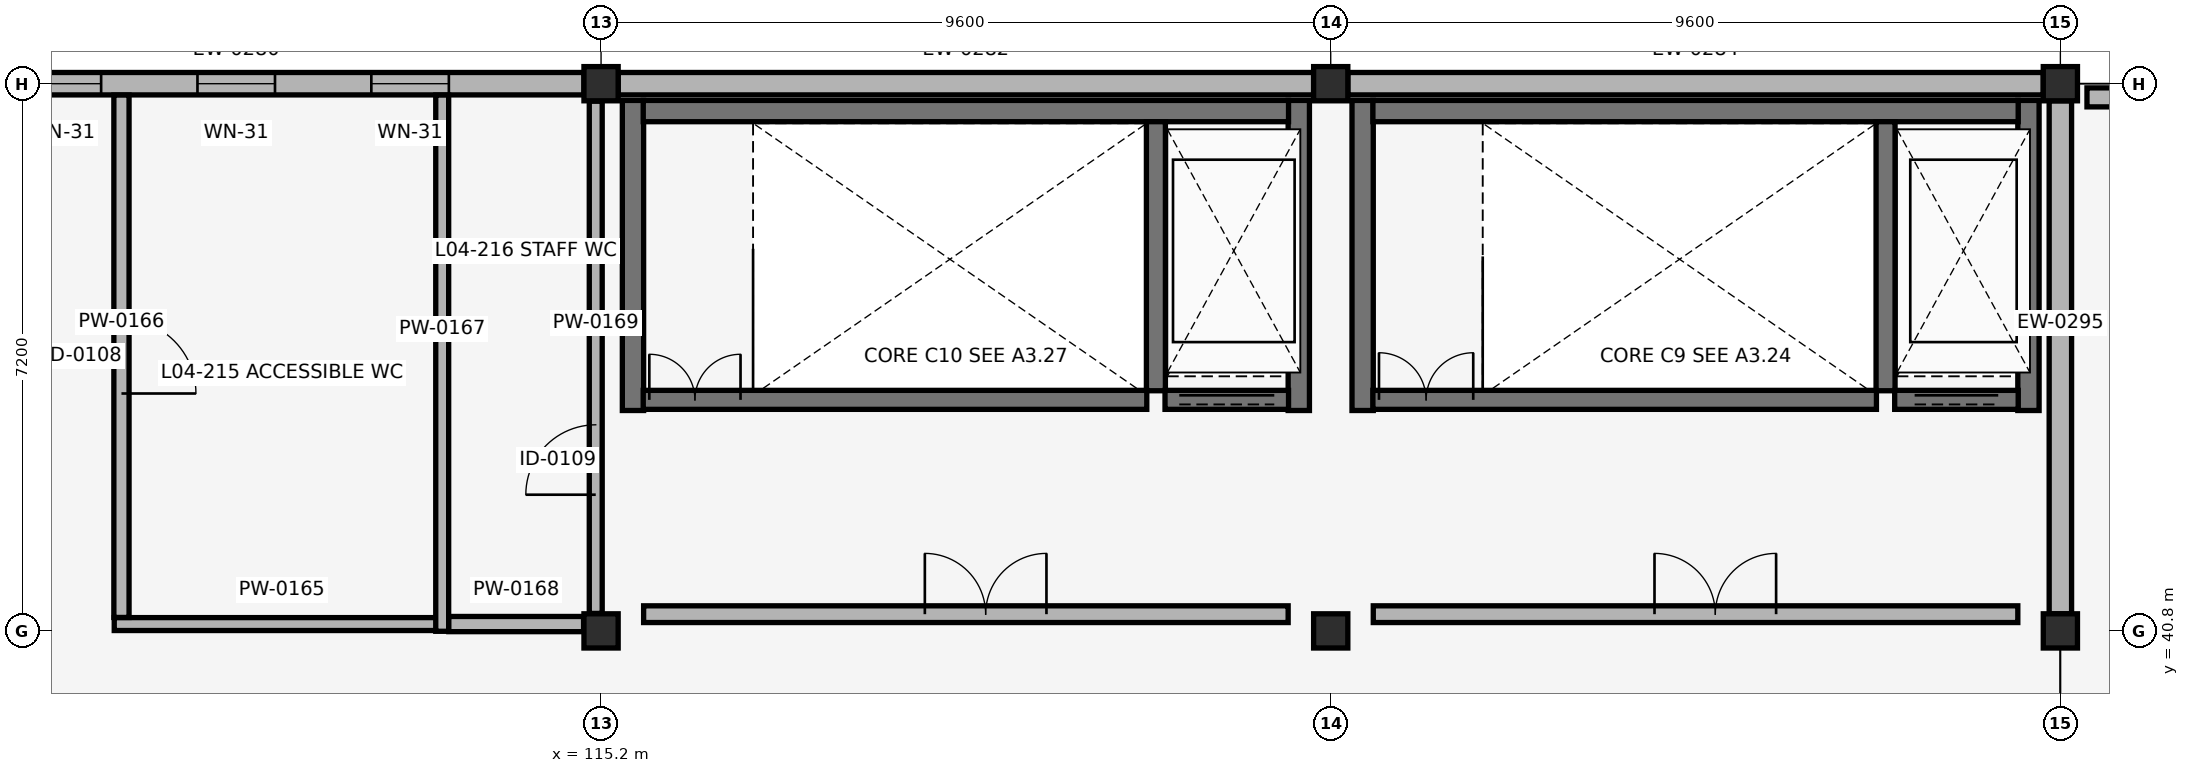
"""IFC4 building model, lengths in metres.
Left out: names, types, materials, properties, quantities, classifications, styles, units other than length and angle.
Written with IfcOpenShell. Run it as: python <this file> out.ifc"""

import sys

from ifc_helpers import new_model, si_unit, direction, frame, frame_2d, origin, origin_2d, place, context, subcontext, project, spatial, rectangle, extrude, element, fill, save


model = new_model("IFC4")
c1 = context("Model", 3, precision=1e-05, world=origin(), true_north=direction((0.0, 1.0)))
c2 = subcontext(c1, "Body", "Model", "MODEL_VIEW")
j1 = project(units=[si_unit("LENGTHUNIT", "METRE"), si_unit("PLANEANGLEUNIT", "RADIAN")], contexts=[c1])
p1 = place(None, origin())
s1 = spatial("IfcSite", under=j1, at=p1, CompositionType="ELEMENT")
p2 = place(p1, origin())
s2 = spatial("IfcBuilding", under=s1, at=p2, CompositionType="ELEMENT")
p3 = place(p2, frame((0.0, 0.0, 16.66)))
s3 = spatial("IfcBuildingStorey", under=s2, at=p3, CompositionType="ELEMENT", Elevation=16.66)
for number, where, z_axis, x_axis in (
    (1, (115.2, 40.8, 0.0), (0.0, 0.0, 1.0), (1.0, 0.0, 0.0)),
    (2, (115.2, 48.0, 0.0), (0.0, 0.0, 1.0), (1.0, 0.0, 0.0)),
    (3, (124.8, 40.8, 0.0), (0.0, 0.0, 1.0), (1.0, 0.0, 0.0)),
    (4, (124.8, 48.0, 0.0), (0.0, 0.0, 1.0), (1.0, 0.0, 0.0)),
    (5, (134.4, 40.8, 0.0), (0.0, 0.0, 1.0), (1.0, 0.0, 0.0)),
    (6, (134.4, 48.0, 0.0), (0.0, 0.0, 1.0), (1.0, 0.0, 0.0)),
):
    element("IfcColumn", number, at=place(p3, frame(where, z_axis=z_axis, x_axis=x_axis)), inside=s3, PredefinedType="COLUMN", context=c2, shape_type="SweptSolid", body=[
        extrude(rectangle(XDim=0.45, YDim=0.45, at=origin_2d()), origin(), (0.0, 0.0, 1.0), 4.08),
    ])
p4 = place(p3, frame((114.975, 48.0, 0.0), z_axis=(0.0, 0.0, 1.0), x_axis=(-1.0, 0.0, 0.0)))
e7 = element("IfcWall", 7, at=p4, inside=s3, PredefinedType="SOLIDWALL", context=c2, shape_type="SweptSolid", body=[
    extrude(rectangle(XDim=9.15, YDim=0.295, at=frame_2d((4.575, 0.0))), origin(), (0.0, 0.0, 1.0), 3.06),
])
p5 = place(p4, frame((1.778, 0.0, 0.88)))
e8 = element("IfcOpeningElement", 8, at=p5, cuts=e7, PredefinedType="OPENING", context=c2, shape_type="SweptSolid", body=[
    extrude(rectangle(XDim=1.02, YDim=1.88, at=frame_2d((0.51, 0.94))), frame((0.0, 0.157, 0.0), z_axis=(0.0, -1.0, 0.0), x_axis=(1.0, 0.0, 0.0)), (0.0, 0.0, 1.0), 0.315),
])
p6 = place(p4, frame((4.065, 0.0, 0.88)))
e9 = element("IfcOpeningElement", 9, at=p6, cuts=e7, PredefinedType="OPENING", context=c2, shape_type="SweptSolid", body=[
    extrude(rectangle(XDim=1.02, YDim=1.88, at=frame_2d((0.51, 0.94))), frame((0.0, 0.157, 0.0), z_axis=(0.0, -1.0, 0.0), x_axis=(1.0, 0.0, 0.0)), (0.0, 0.0, 1.0), 0.315),
])
p7 = place(p4, frame((6.353, 0.0, 0.88)))
e10 = element("IfcOpeningElement", 10, at=p7, cuts=e7, PredefinedType="OPENING", context=c2, shape_type="SweptSolid", body=[
    extrude(rectangle(XDim=1.02, YDim=1.88, at=frame_2d((0.51, 0.94))), frame((0.0, 0.157, 0.0), z_axis=(0.0, -1.0, 0.0), x_axis=(1.0, 0.0, 0.0)), (0.0, 0.0, 1.0), 0.315),
])
p8 = place(p3, frame((124.575, 48.0, 0.0), z_axis=(0.0, 0.0, 1.0), x_axis=(-1.0, 0.0, 0.0)))
e11 = element("IfcWall", 11, at=p8, inside=s3, PredefinedType="SOLIDWALL", context=c2, shape_type="SweptSolid", body=[
    extrude(rectangle(XDim=9.15, YDim=0.295, at=frame_2d((4.575, 0.0))), origin(), (0.0, 0.0, 1.0), 3.06),
])
p9 = place(p3, frame((134.175, 48.0, 0.0), z_axis=(0.0, 0.0, 1.0), x_axis=(-1.0, 0.0, 0.0)))
e12 = element("IfcWall", 12, at=p9, inside=s3, PredefinedType="SOLIDWALL", context=c2, shape_type="SweptSolid", body=[
    extrude(rectangle(XDim=9.15, YDim=0.295, at=frame_2d((4.575, 0.0))), origin(), (0.0, 0.0, 1.0), 3.06),
])
p10 = place(p3, frame((134.4, 41.025, 0.0), z_axis=(0.0, 0.0, 1.0), x_axis=(0.0, 1.0, 0.0)))
e13 = element("IfcWall", 13, at=p10, inside=s3, PredefinedType="SOLIDWALL", context=c2, shape_type="SweptSolid", body=[
    extrude(rectangle(XDim=6.75, YDim=0.295, at=frame_2d((3.375, 0.0))), origin(), (0.0, 0.0, 1.0), 3.06),
])
p11 = place(p3, frame((134.75, 47.82, 0.0), z_axis=(0.0, 0.0, 1.0), x_axis=(1.0, 0.0, 0.0)))
e14 = element("IfcWall", 14, at=p11, inside=s3, PredefinedType="PARAPET", context=c2, shape_type="SweptSolid", body=[
    extrude(rectangle(XDim=18.5, YDim=0.25, at=frame_2d((9.25, 0.0))), origin(), (0.0, 0.0, 1.0), 1.12),
])
for number, where, z_axis, x_axis in (
    (15, (125.22, 43.7, 0.0), (0.0, 0.0, 1.0), (0.0, 1.0, 0.0)),
    (16, (133.98, 43.7, 0.0), (0.0, 0.0, 1.0), (0.0, 1.0, 0.0)),
):
    element("IfcWall", number, at=place(p3, frame(where, z_axis=z_axis, x_axis=x_axis)), inside=s3, PredefinedType="SHEAR", context=c2, shape_type="SweptSolid", body=[
        extrude(rectangle(XDim=4.08, YDim=0.28, at=frame_2d((2.04, 0.0))), origin(), (0.0, 0.0, 1.0), 3.78),
    ])
p12 = place(p3, frame((125.355, 47.64, 0.0), z_axis=(0.0, 0.0, 1.0), x_axis=(1.0, 0.0, 0.0)))
e17 = element("IfcWall", 17, at=p12, inside=s3, PredefinedType="SHEAR", context=c2, shape_type="SweptSolid", body=[
    extrude(rectangle(XDim=8.49, YDim=0.28, at=frame_2d((4.245, 0.0))), origin(), (0.0, 0.0, 1.0), 3.78),
])
p13 = place(p3, frame((132.1, 43.96, 0.0), z_axis=(0.0, 0.0, 1.0), x_axis=(0.0, 1.0, 0.0)))
e18 = element("IfcWall", 18, at=p13, inside=s3, PredefinedType="SHEAR", context=c2, shape_type="SweptSolid", body=[
    extrude(rectangle(XDim=3.54, YDim=0.25, at=frame_2d((1.77, 0.0))), origin(), (0.0, 0.0, 1.0), 3.78),
])
p14 = place(p3, frame((125.355, 43.84, 0.0), z_axis=(0.0, 0.0, 1.0), x_axis=(1.0, 0.0, 0.0)))
e19 = element("IfcWall", 19, at=p14, inside=s3, PredefinedType="SHEAR", context=c2, shape_type="SweptSolid", body=[
    extrude(rectangle(XDim=6.625, YDim=0.25, at=frame_2d((3.312, 0.0))), origin(), (0.0, 0.0, 1.0), 3.78),
])
p15 = place(p14, frame((0.08, 0.0, 0.0)))
e20 = element("IfcOpeningElement", 20, at=p15, cuts=e19, PredefinedType="OPENING", context=c2, shape_type="SweptSolid", body=[
    extrude(rectangle(XDim=1.24, YDim=2.15, at=frame_2d((0.62, 1.075))), frame((0.0, 0.135, 0.0), z_axis=(0.0, -1.0, 0.0), x_axis=(1.0, 0.0, 0.0)), (0.0, 0.0, 1.0), 0.27),
])
p16 = place(p3, frame((125.36, 41.02, 0.0), z_axis=(0.0, 0.0, 1.0), x_axis=(1.0, 0.0, 0.0)))
e21 = element("IfcWall", 21, at=p16, inside=s3, PredefinedType="PARTITIONING", context=c2, shape_type="SweptSolid", body=[
    extrude(rectangle(XDim=8.48, YDim=0.22, at=frame_2d((4.24, 0.0))), origin(), (0.0, 0.0, 1.0), 3.19),
])
p17 = place(p16, frame((3.7, 0.0, 0.0)))
e22 = element("IfcOpeningElement", 22, at=p17, cuts=e21, PredefinedType="OPENING", context=c2, shape_type="SweptSolid", body=[
    extrude(rectangle(XDim=1.6, YDim=2.2, at=frame_2d((0.8, 1.1))), frame((0.0, 0.12, 0.0), z_axis=(0.0, -1.0, 0.0), x_axis=(1.0, 0.0, 0.0)), (0.0, 0.0, 1.0), 0.24),
])
p18 = place(p3, frame((132.22, 43.84, 0.0), z_axis=(0.0, 0.0, 1.0), x_axis=(1.0, 0.0, 0.0)))
e23 = element("IfcWall", 23, at=p18, inside=s3, PredefinedType="SHEAR", context=c2, shape_type="SweptSolid", body=[
    extrude(rectangle(XDim=1.625, YDim=0.25, at=frame_2d((0.812, 0.0))), origin(), (0.0, 0.0, 1.0), 3.78),
])
p19 = place(p18, frame((0.262, 0.0, 0.0)))
e24 = element("IfcOpeningElement", 24, at=p19, cuts=e23, PredefinedType="OPENING", context=c2, shape_type="SweptSolid", body=[
    extrude(rectangle(XDim=1.1, YDim=2.15, at=frame_2d((0.55, 1.075))), frame((0.0, 0.135, 0.0), z_axis=(0.0, -1.0, 0.0), x_axis=(1.0, 0.0, 0.0)), (0.0, 0.0, 1.0), 0.27),
])
for number, where, z_axis, x_axis in (
    (25, (115.62, 43.7, 0.0), (0.0, 0.0, 1.0), (0.0, 1.0, 0.0)),
    (26, (124.38, 43.7, 0.0), (0.0, 0.0, 1.0), (0.0, 1.0, 0.0)),
):
    element("IfcWall", number, at=place(p3, frame(where, z_axis=z_axis, x_axis=x_axis)), inside=s3, PredefinedType="SHEAR", context=c2, shape_type="SweptSolid", body=[
        extrude(rectangle(XDim=4.08, YDim=0.28, at=frame_2d((2.04, 0.0))), origin(), (0.0, 0.0, 1.0), 3.78),
    ])
p20 = place(p3, frame((115.755, 47.64, 0.0), z_axis=(0.0, 0.0, 1.0), x_axis=(1.0, 0.0, 0.0)))
e27 = element("IfcWall", 27, at=p20, inside=s3, PredefinedType="SHEAR", context=c2, shape_type="SweptSolid", body=[
    extrude(rectangle(XDim=8.49, YDim=0.28, at=frame_2d((4.245, 0.0))), origin(), (0.0, 0.0, 1.0), 3.78),
])
p21 = place(p3, frame((122.5, 43.96, 0.0), z_axis=(0.0, 0.0, 1.0), x_axis=(0.0, 1.0, 0.0)))
e28 = element("IfcWall", 28, at=p21, inside=s3, PredefinedType="SHEAR", context=c2, shape_type="SweptSolid", body=[
    extrude(rectangle(XDim=3.54, YDim=0.25, at=frame_2d((1.77, 0.0))), origin(), (0.0, 0.0, 1.0), 3.78),
])
p22 = place(p3, frame((115.755, 43.84, 0.0), z_axis=(0.0, 0.0, 1.0), x_axis=(1.0, 0.0, 0.0)))
e29 = element("IfcWall", 29, at=p22, inside=s3, PredefinedType="SHEAR", context=c2, shape_type="SweptSolid", body=[
    extrude(rectangle(XDim=6.625, YDim=0.25, at=frame_2d((3.312, 0.0))), origin(), (0.0, 0.0, 1.0), 3.78),
])
p23 = place(p22, frame((0.08, 0.0, 0.0)))
e30 = element("IfcOpeningElement", 30, at=p23, cuts=e29, PredefinedType="OPENING", context=c2, shape_type="SweptSolid", body=[
    extrude(rectangle(XDim=1.2, YDim=2.15, at=frame_2d((0.6, 1.075))), frame((0.0, 0.135, 0.0), z_axis=(0.0, -1.0, 0.0), x_axis=(1.0, 0.0, 0.0)), (0.0, 0.0, 1.0), 0.27),
])
p24 = place(p3, frame((115.76, 41.02, 0.0), z_axis=(0.0, 0.0, 1.0), x_axis=(1.0, 0.0, 0.0)))
e31 = element("IfcWall", 31, at=p24, inside=s3, PredefinedType="PARTITIONING", context=c2, shape_type="SweptSolid", body=[
    extrude(rectangle(XDim=8.48, YDim=0.22, at=frame_2d((4.24, 0.0))), origin(), (0.0, 0.0, 1.0), 3.19),
])
p25 = place(p24, frame((3.7, 0.0, 0.0)))
e32 = element("IfcOpeningElement", 32, at=p25, cuts=e31, PredefinedType="OPENING", context=c2, shape_type="SweptSolid", body=[
    extrude(rectangle(XDim=1.6, YDim=2.2, at=frame_2d((0.8, 1.1))), frame((0.0, 0.12, 0.0), z_axis=(0.0, -1.0, 0.0), x_axis=(1.0, 0.0, 0.0)), (0.0, 0.0, 1.0), 0.24),
])
p26 = place(p3, frame((122.62, 43.84, 0.0), z_axis=(0.0, 0.0, 1.0), x_axis=(1.0, 0.0, 0.0)))
e33 = element("IfcWall", 33, at=p26, inside=s3, PredefinedType="SHEAR", context=c2, shape_type="SweptSolid", body=[
    extrude(rectangle(XDim=1.625, YDim=0.25, at=frame_2d((0.812, 0.0))), origin(), (0.0, 0.0, 1.0), 3.78),
])
p27 = place(p26, frame((0.188, 0.0, 0.0)))
e34 = element("IfcOpeningElement", 34, at=p27, cuts=e33, PredefinedType="OPENING", context=c2, shape_type="SweptSolid", body=[
    extrude(rectangle(XDim=1.25, YDim=2.15, at=frame_2d((0.625, 1.075))), frame((0.0, 0.135, 0.0), z_axis=(0.0, -1.0, 0.0), x_axis=(1.0, 0.0, 0.0)), (0.0, 0.0, 1.0), 0.27),
])
p28 = place(p3, frame((108.795, 40.89, 0.0), z_axis=(0.0, 0.0, 1.0), x_axis=(1.0, 0.0, 0.0)))
e35 = element("IfcWall", 35, at=p28, inside=s3, PredefinedType="PLUMBINGWALL", context=c2, shape_type="SweptSolid", body=[
    extrude(rectangle(XDim=4.41, YDim=0.17, at=frame_2d((2.205, 0.0))), origin(), (0.0, 0.0, 1.0), 3.12),
])
p29 = place(p3, frame((108.89, 40.977, 0.0), z_axis=(0.0, 0.0, 1.0), x_axis=(0.0, 1.0, 0.0)))
e36 = element("IfcWall", 36, at=p29, inside=s3, PredefinedType="PLUMBINGWALL", context=c2, shape_type="SweptSolid", body=[
    extrude(rectangle(XDim=6.874, YDim=0.2, at=frame_2d((3.437, 0.0))), origin(), (0.0, 0.0, 1.0), 3.09),
])
p30 = place(p29, frame((2.947, 0.0, 0.0)))
e37 = element("IfcOpeningElement", 37, at=p30, cuts=e36, PredefinedType="OPENING", context=c2, shape_type="SweptSolid", body=[
    extrude(rectangle(XDim=0.98, YDim=2.08, at=frame_2d((0.49, 1.04))), frame((0.0, 0.11, 0.0), z_axis=(0.0, -1.0, 0.0), x_axis=(1.0, 0.0, 0.0)), (0.0, 0.0, 1.0), 0.22),
])
p31 = place(p3, frame((113.11, 40.795, 0.0), z_axis=(0.0, 0.0, 1.0), x_axis=(0.0, 1.0, 0.0)))
e38 = element("IfcWall", 38, at=p31, inside=s3, PredefinedType="PLUMBINGWALL", context=c2, shape_type="SweptSolid", body=[
    extrude(rectangle(XDim=7.056, YDim=0.17, at=frame_2d((3.528, 0.0))), origin(), (0.0, 0.0, 1.0), 3.09),
])
p32 = place(p3, frame((113.197, 40.89, 0.0), z_axis=(0.0, 0.0, 1.0), x_axis=(1.0, 0.0, 0.0)))
e39 = element("IfcWall", 39, at=p32, inside=s3, PredefinedType="PLUMBINGWALL", context=c2, shape_type="SweptSolid", body=[
    extrude(rectangle(XDim=1.773, YDim=0.2, at=frame_2d((0.886, 0.0))), origin(), (0.0, 0.0, 1.0), 3.12),
])
p33 = place(p3, frame((115.13, 41.03, 0.0), z_axis=(0.0, 0.0, 1.0), x_axis=(0.0, 1.0, 0.0)))
e40 = element("IfcWall", 40, at=p33, inside=s3, PredefinedType="PLUMBINGWALL", context=c2, shape_type="SweptSolid", body=[
    extrude(rectangle(XDim=6.74, YDim=0.17, at=frame_2d((3.37, 0.0))), origin(), (0.0, 0.0, 1.0), 3.12),
])
p34 = place(p33, frame((1.562, 0.0, 0.0)))
e41 = element("IfcOpeningElement", 41, at=p34, cuts=e40, PredefinedType="OPENING", context=c2, shape_type="SweptSolid", body=[
    extrude(rectangle(XDim=0.92, YDim=2.08, at=frame_2d((0.46, 1.04))), frame((0.0, 0.095, 0.0), z_axis=(0.0, -1.0, 0.0), x_axis=(1.0, 0.0, 0.0)), (0.0, 0.0, 1.0), 0.19),
])
p35 = place(p5, origin())
e42 = element("IfcWindow", 42, at=p35, inside=s3, PartitioningType="SINGLE_PANEL", PredefinedType="WINDOW", context=c2, shape_type="SweptSolid", body=[
    extrude(rectangle(XDim=1.02, YDim=1.88, at=frame_2d((0.51, 0.94))), frame((0.0, 0.03, 0.0), z_axis=(0.0, -1.0, 0.0), x_axis=(1.0, 0.0, 0.0)), (0.0, 0.0, 1.0), 0.06),
])
fill(e8, e42)
p36 = place(p6, origin())
e43 = element("IfcWindow", 43, at=p36, inside=s3, PartitioningType="SINGLE_PANEL", PredefinedType="WINDOW", context=c2, shape_type="SweptSolid", body=[
    extrude(rectangle(XDim=1.02, YDim=1.88, at=frame_2d((0.51, 0.94))), frame((0.0, 0.03, 0.0), z_axis=(0.0, -1.0, 0.0), x_axis=(1.0, 0.0, 0.0)), (0.0, 0.0, 1.0), 0.06),
])
fill(e9, e43)
p37 = place(p7, origin())
e44 = element("IfcWindow", 44, at=p37, inside=s3, PartitioningType="SINGLE_PANEL", PredefinedType="WINDOW", context=c2, shape_type="SweptSolid", body=[
    extrude(rectangle(XDim=1.02, YDim=1.88, at=frame_2d((0.51, 0.94))), frame((0.0, 0.03, 0.0), z_axis=(0.0, -1.0, 0.0), x_axis=(1.0, 0.0, 0.0)), (0.0, 0.0, 1.0), 0.06),
])
fill(e10, e44)
p38 = place(p15, origin())
e45 = element("IfcDoor", 45, at=p38, inside=s3, OperationType="DOUBLE_DOOR_SINGLE_SWING", PredefinedType="DOOR", context=c2, shape_type="SweptSolid", body=[
    extrude(rectangle(XDim=1.24, YDim=2.15, at=frame_2d((0.62, 1.075))), frame((0.0, 0.025, 0.0), z_axis=(0.0, -1.0, 0.0), x_axis=(1.0, 0.0, 0.0)), (0.0, 0.0, 1.0), 0.05),
])
fill(e20, e45)
p39 = place(p17, origin())
e46 = element("IfcDoor", 46, at=p39, inside=s3, OperationType="DOUBLE_DOOR_SINGLE_SWING", PredefinedType="DOOR", context=c2, shape_type="SweptSolid", body=[
    extrude(rectangle(XDim=1.6, YDim=2.2, at=frame_2d((0.8, 1.1))), frame((0.0, 0.025, 0.0), z_axis=(0.0, -1.0, 0.0), x_axis=(1.0, 0.0, 0.0)), (0.0, 0.0, 1.0), 0.05),
])
fill(e22, e46)
p40 = place(p19, origin())
e47 = element("IfcDoor", 47, at=p40, inside=s3, OperationType="DOUBLE_DOOR_SLIDING", PredefinedType="DOOR", context=c2, shape_type="SweptSolid", body=[
    extrude(rectangle(XDim=1.1, YDim=2.15, at=frame_2d((0.55, 1.075))), frame((0.0, 0.025, 0.0), z_axis=(0.0, -1.0, 0.0), x_axis=(1.0, 0.0, 0.0)), (0.0, 0.0, 1.0), 0.05),
])
fill(e24, e47)
p41 = place(p23, origin())
e48 = element("IfcDoor", 48, at=p41, inside=s3, OperationType="DOUBLE_DOOR_SINGLE_SWING", PredefinedType="DOOR", context=c2, shape_type="SweptSolid", body=[
    extrude(rectangle(XDim=1.2, YDim=2.15, at=frame_2d((0.6, 1.075))), frame((0.0, 0.025, 0.0), z_axis=(0.0, -1.0, 0.0), x_axis=(1.0, 0.0, 0.0)), (0.0, 0.0, 1.0), 0.05),
])
fill(e30, e48)
p42 = place(p25, origin())
e49 = element("IfcDoor", 49, at=p42, inside=s3, OperationType="DOUBLE_DOOR_SINGLE_SWING", PredefinedType="DOOR", context=c2, shape_type="SweptSolid", body=[
    extrude(rectangle(XDim=1.6, YDim=2.2, at=frame_2d((0.8, 1.1))), frame((0.0, 0.025, 0.0), z_axis=(0.0, -1.0, 0.0), x_axis=(1.0, 0.0, 0.0)), (0.0, 0.0, 1.0), 0.05),
])
fill(e32, e49)
p43 = place(p27, origin())
e50 = element("IfcDoor", 50, at=p43, inside=s3, OperationType="DOUBLE_DOOR_SLIDING", PredefinedType="DOOR", context=c2, shape_type="SweptSolid", body=[
    extrude(rectangle(XDim=1.25, YDim=2.15, at=frame_2d((0.625, 1.075))), frame((0.0, 0.025, 0.0), z_axis=(0.0, -1.0, 0.0), x_axis=(1.0, 0.0, 0.0)), (0.0, 0.0, 1.0), 0.05),
])
fill(e34, e50)
p44 = place(p30, origin())
e51 = element("IfcDoor", 51, at=p44, inside=s3, OperationType="SINGLE_SWING_RIGHT", PredefinedType="DOOR", context=c2, shape_type="SweptSolid", body=[
    extrude(rectangle(XDim=0.98, YDim=2.08, at=frame_2d((0.49, 1.04))), frame((0.0, 0.025, 0.0), z_axis=(0.0, -1.0, 0.0), x_axis=(1.0, 0.0, 0.0)), (0.0, 0.0, 1.0), 0.05),
])
fill(e37, e51)
p45 = place(p34, origin())
e52 = element("IfcDoor", 52, at=p45, inside=s3, OperationType="SINGLE_SWING_LEFT", PredefinedType="DOOR", context=c2, shape_type="SweptSolid", body=[
    extrude(rectangle(XDim=0.92, YDim=2.08, at=frame_2d((0.46, 1.04))), frame((0.0, 0.025, 0.0), z_axis=(0.0, -1.0, 0.0), x_axis=(1.0, 0.0, 0.0)), (0.0, 0.0, 1.0), 0.05),
])
fill(e41, e52)
save(model, sys.argv[1])
